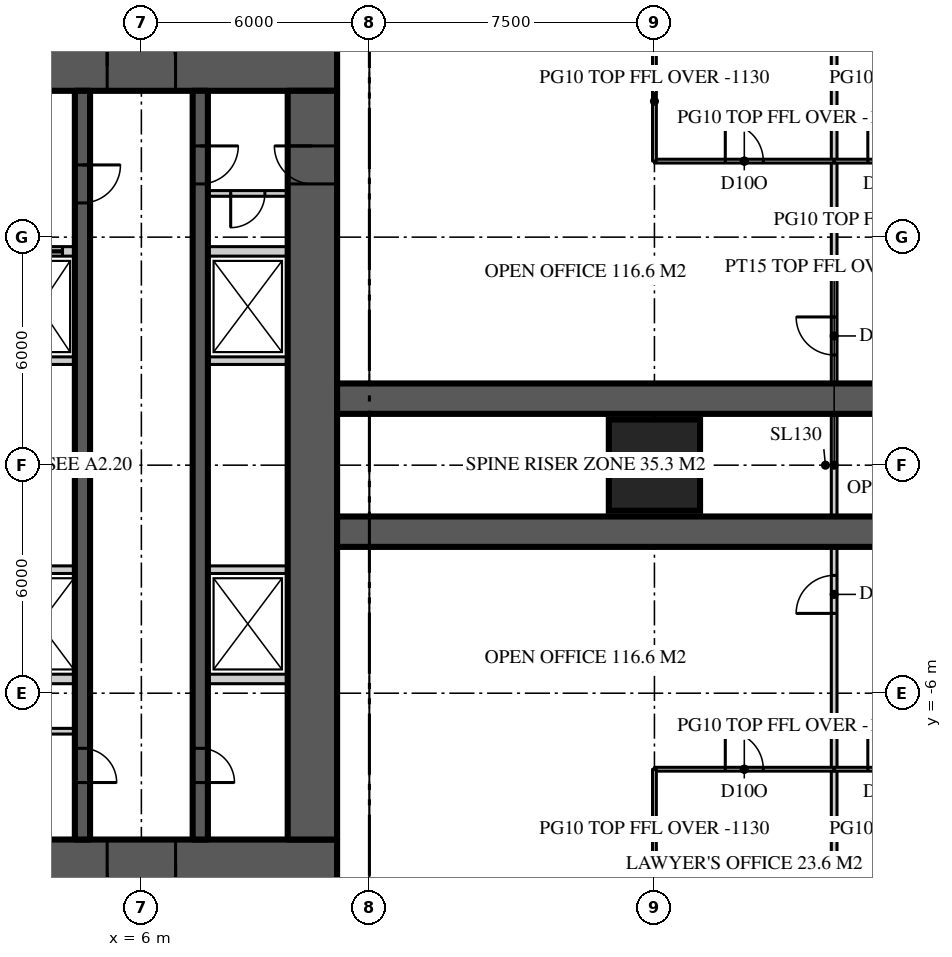
"""IFC4 building model, lengths in metres.
Left out: names, types, materials, properties, quantities, classifications, styles, units other than length and angle.
Written with IfcOpenShell. Run it as: python <this file> out.ifc"""

import sys

from ifc_helpers import new_model, si_unit, direction, frame, frame_2d, origin, origin_2d, place, context, subcontext, project, spatial, rectangle, extrude, element, fill, save


model = new_model("IFC4")
c1 = context("Model", 3, precision=1e-05, world=origin(), true_north=direction((0.0, 1.0)))
c2 = subcontext(c1, "Body", "Model", "MODEL_VIEW")
j1 = project(units=[si_unit("LENGTHUNIT", "METRE"), si_unit("PLANEANGLEUNIT", "RADIAN")], contexts=[c1])
p1 = place(None, origin())
s1 = spatial("IfcSite", under=j1, at=p1, CompositionType="ELEMENT")
p2 = place(p1, origin())
s2 = spatial("IfcBuilding", under=s1, at=p2, CompositionType="ELEMENT")
p3 = place(p2, frame((0.0, 0.0, 135.9)))
s3 = spatial("IfcBuildingStorey", under=s2, at=p3, CompositionType="ELEMENT", Elevation=135.9)
p4 = place(p3, frame((-11.15, 10.5, 0.0), z_axis=(0.0, 0.0, 1.0), x_axis=(1.0, 0.0, 0.0)))
e1 = element("IfcWall", 1, at=p4, inside=s3, PredefinedType="SHEAR", context=c2, shape_type="SweptSolid", body=[
    extrude(rectangle(XDim=22.3, YDim=1.3, at=frame_2d((11.15, 0.0))), origin(), (0.0, 0.0, 1.0), 3.9),
])
p5 = place(p4, frame((4.25, 0.0, 0.0)))
e2 = element("IfcOpeningElement", 2, at=p5, cuts=e1, PredefinedType="OPENING", context=c2, shape_type="SweptSolid", body=[
    extrude(rectangle(XDim=1.8, YDim=2.2, at=frame_2d((0.9, 1.1))), frame((0.0, 0.66, 0.0), z_axis=(0.0, -1.0, 0.0), x_axis=(1.0, 0.0, 0.0)), (0.0, 0.0, 1.0), 1.32),
])
p6 = place(p4, frame((16.25, 0.0, 0.0)))
e3 = element("IfcOpeningElement", 3, at=p6, cuts=e1, PredefinedType="OPENING", context=c2, shape_type="SweptSolid", body=[
    extrude(rectangle(XDim=1.8, YDim=2.2, at=frame_2d((0.9, 1.1))), frame((0.0, 0.66, 0.0), z_axis=(0.0, -1.0, 0.0), x_axis=(1.0, 0.0, 0.0)), (0.0, 0.0, 1.0), 1.32),
])
p7 = place(p3, frame((11.15, -10.5, 0.0), z_axis=(0.0, 0.0, 1.0), x_axis=(-1.0, 0.0, 0.0)))
e4 = element("IfcWall", 4, at=p7, inside=s3, PredefinedType="SHEAR", context=c2, shape_type="SweptSolid", body=[
    extrude(rectangle(XDim=22.3, YDim=1.3, at=frame_2d((11.15, 0.0))), origin(), (0.0, 0.0, 1.0), 3.9),
])
p8 = place(p7, frame((16.25, 0.0, 0.0)))
e5 = element("IfcOpeningElement", 5, at=p8, cuts=e4, PredefinedType="OPENING", context=c2, shape_type="SweptSolid", body=[
    extrude(rectangle(XDim=1.8, YDim=2.2, at=frame_2d((0.9, 1.1))), frame((0.0, 0.66, 0.0), z_axis=(0.0, -1.0, 0.0), x_axis=(1.0, 0.0, 0.0)), (0.0, 0.0, 1.0), 1.32),
])
p9 = place(p7, frame((4.25, 0.0, 0.0)))
e6 = element("IfcOpeningElement", 6, at=p9, cuts=e4, PredefinedType="OPENING", context=c2, shape_type="SweptSolid", body=[
    extrude(rectangle(XDim=1.8, YDim=2.2, at=frame_2d((0.9, 1.1))), frame((0.0, 0.66, 0.0), z_axis=(0.0, -1.0, 0.0), x_axis=(1.0, 0.0, 0.0)), (0.0, 0.0, 1.0), 1.32),
])
p10 = place(p3, frame((10.5, -9.85, 0.0), z_axis=(0.0, 0.0, 1.0), x_axis=(0.0, 1.0, 0.0)))
e7 = element("IfcWall", 7, at=p10, inside=s3, PredefinedType="SHEAR", context=c2, shape_type="SweptSolid", body=[
    extrude(rectangle(XDim=19.7, YDim=1.3, at=frame_2d((9.85, 0.0))), origin(), (0.0, 0.0, 1.0), 3.9),
])
p11 = place(p10, frame((17.25, 0.0, 0.0)))
e8 = element("IfcOpeningElement", 8, at=p11, cuts=e7, PredefinedType="OPENING", context=c2, shape_type="SweptSolid", body=[
    extrude(rectangle(XDim=1.0, YDim=2.2, at=frame_2d((0.5, 1.1))), frame((0.0, 0.66, 0.0), z_axis=(0.0, -1.0, 0.0), x_axis=(1.0, 0.0, 0.0)), (0.0, 0.0, 1.0), 1.32),
])
for number, where, z_axis, x_axis in (
    (9, (11.15, -1.75, 0.0), (0.0, 0.0, 1.0), (1.0, 0.0, 0.0)),
    (10, (11.15, 1.75, 0.0), (0.0, 0.0, 1.0), (1.0, 0.0, 0.0)),
):
    element("IfcWall", number, at=place(p3, frame(where, z_axis=z_axis, x_axis=x_axis)), inside=s3, PredefinedType="SHEAR", context=c2, shape_type="SweptSolid", body=[
        extrude(rectangle(XDim=15.25, YDim=0.8, at=frame_2d((7.625, 0.0))), origin(), (0.0, 0.0, 1.0), 3.9),
    ])
p12 = place(p3, frame((19.5, 0.0, 0.0), z_axis=(0.0, 0.0, 1.0), x_axis=(1.0, 0.0, 0.0)))
e11 = element("IfcColumn", 11, at=p12, inside=s3, PredefinedType="COLUMN", context=c2, shape_type="SweptSolid", body=[
    extrude(rectangle(XDim=2.4, YDim=2.4, at=origin_2d()), origin(), (0.0, 0.0, 1.0), 3.9),
])
p13 = place(p3, frame((7.55, 9.85, 0.0), z_axis=(0.0, 0.0, 1.0), x_axis=(0.0, -1.0, 0.0)))
e12 = element("IfcWall", 12, at=p13, inside=s3, PredefinedType="SHEAR", context=c2, shape_type="SweptSolid", body=[
    extrude(rectangle(XDim=19.7, YDim=0.4, at=frame_2d((9.85, 0.0))), origin(), (0.0, 0.0, 1.0), 3.9),
])
p14 = place(p13, frame((1.45, 0.0, 0.0)))
e13 = element("IfcOpeningElement", 13, at=p14, cuts=e12, PredefinedType="OPENING", context=c2, shape_type="SweptSolid", body=[
    extrude(rectangle(XDim=1.0, YDim=2.2, at=frame_2d((0.5, 1.1))), frame((0.0, 0.21, 0.0), z_axis=(0.0, -1.0, 0.0), x_axis=(1.0, 0.0, 0.0)), (0.0, 0.0, 1.0), 0.42),
])
p15 = place(p13, frame((17.3, 0.0, 0.0)))
e14 = element("IfcOpeningElement", 14, at=p15, cuts=e12, PredefinedType="OPENING", context=c2, shape_type="SweptSolid", body=[
    extrude(rectangle(XDim=0.9, YDim=2.1, at=frame_2d((0.45, 1.05))), frame((0.0, 0.21, 0.0), z_axis=(0.0, -1.0, 0.0), x_axis=(1.0, 0.0, 0.0)), (0.0, 0.0, 1.0), 0.42),
])
p16 = place(p3, frame((4.45, 9.85, 0.0), z_axis=(0.0, 0.0, 1.0), x_axis=(0.0, -1.0, 0.0)))
e15 = element("IfcWall", 15, at=p16, inside=s3, PredefinedType="SHEAR", context=c2, shape_type="SweptSolid", body=[
    extrude(rectangle(XDim=19.7, YDim=0.4, at=frame_2d((9.85, 0.0))), origin(), (0.0, 0.0, 1.0), 3.9),
])
p17 = place(p16, frame((1.95, 0.0, 0.0)))
e16 = element("IfcOpeningElement", 16, at=p17, cuts=e15, PredefinedType="OPENING", context=c2, shape_type="SweptSolid", body=[
    extrude(rectangle(XDim=1.0, YDim=2.2, at=frame_2d((0.5, 1.1))), frame((0.0, 0.21, 0.0), z_axis=(0.0, -1.0, 0.0), x_axis=(1.0, 0.0, 0.0)), (0.0, 0.0, 1.0), 0.42),
])
p18 = place(p16, frame((17.3, 0.0, 0.0)))
e17 = element("IfcOpeningElement", 17, at=p18, cuts=e15, PredefinedType="OPENING", context=c2, shape_type="SweptSolid", body=[
    extrude(rectangle(XDim=0.9, YDim=2.1, at=frame_2d((0.45, 1.05))), frame((0.0, 0.21, 0.0), z_axis=(0.0, -1.0, 0.0), x_axis=(1.0, 0.0, 0.0)), (0.0, 0.0, 1.0), 0.42),
])
p19 = place(p3, frame((2.4, 5.625, 0.0), z_axis=(0.0, 0.0, 1.0), x_axis=(1.0, 0.0, 0.0)))
e18 = element("IfcWall", 18, at=p19, inside=s3, PredefinedType="SOLIDWALL", context=c2, shape_type="SweptSolid", body=[
    extrude(rectangle(XDim=1.85, YDim=0.25, at=frame_2d((0.925, 0.0))), origin(), (0.0, 0.0, 1.0), 3.7),
])
p20 = place(p19, frame((0.325, 0.0, 0.0)))
e19 = element("IfcOpeningElement", 19, at=p20, cuts=e18, PredefinedType="OPENING", context=c2, shape_type="SweptSolid", body=[
    extrude(rectangle(XDim=1.2, YDim=2.2, at=frame_2d((0.6, 1.1))), frame((0.0, 0.135, 0.0), z_axis=(0.0, -1.0, 0.0), x_axis=(1.0, 0.0, 0.0)), (0.0, 0.0, 1.0), 0.27),
])
p21 = place(p3, frame((7.75, 5.625, 0.0), z_axis=(0.0, 0.0, 1.0), x_axis=(1.0, 0.0, 0.0)))
e20 = element("IfcWall", 20, at=p21, inside=s3, PredefinedType="SOLIDWALL", context=c2, shape_type="SweptSolid", body=[
    extrude(rectangle(XDim=2.1, YDim=0.25, at=frame_2d((1.05, 0.0))), origin(), (0.0, 0.0, 1.0), 3.7),
])
p22 = place(p3, frame((2.4, -5.625, 0.0), z_axis=(0.0, 0.0, 1.0), x_axis=(1.0, 0.0, 0.0)))
e21 = element("IfcWall", 21, at=p22, inside=s3, PredefinedType="SOLIDWALL", context=c2, shape_type="SweptSolid", body=[
    extrude(rectangle(XDim=1.85, YDim=0.25, at=frame_2d((0.925, 0.0))), origin(), (0.0, 0.0, 1.0), 3.7),
])
p23 = place(p3, frame((7.75, -5.625, 0.0), z_axis=(0.0, 0.0, 1.0), x_axis=(1.0, 0.0, 0.0)))
e22 = element("IfcWall", 22, at=p23, inside=s3, PredefinedType="SOLIDWALL", context=c2, shape_type="SweptSolid", body=[
    extrude(rectangle(XDim=2.1, YDim=0.25, at=frame_2d((1.05, 0.0))), origin(), (0.0, 0.0, 1.0), 3.7),
])
p24 = place(p3, frame((2.4, -2.75, 0.0), z_axis=(0.0, 0.0, 1.0), x_axis=(1.0, 0.0, 0.0)))
e23 = element("IfcWall", 23, at=p24, inside=s3, PredefinedType="SOLIDWALL", context=c2, shape_type="SweptSolid", body=[
    extrude(rectangle(XDim=1.85, YDim=0.2, at=frame_2d((0.925, 0.0))), origin(), (0.0, 0.0, 1.0), 3.7),
])
p25 = place(p3, frame((7.75, -2.75, 0.0), z_axis=(0.0, 0.0, 1.0), x_axis=(1.0, 0.0, 0.0)))
e24 = element("IfcWall", 24, at=p25, inside=s3, PredefinedType="SOLIDWALL", context=c2, shape_type="SweptSolid", body=[
    extrude(rectangle(XDim=2.1, YDim=0.2, at=frame_2d((1.05, 0.0))), origin(), (0.0, 0.0, 1.0), 3.7),
])
p26 = place(p3, frame((2.4, 2.75, 0.0), z_axis=(0.0, 0.0, 1.0), x_axis=(1.0, 0.0, 0.0)))
e25 = element("IfcWall", 25, at=p26, inside=s3, PredefinedType="SOLIDWALL", context=c2, shape_type="SweptSolid", body=[
    extrude(rectangle(XDim=1.85, YDim=0.2, at=frame_2d((0.925, 0.0))), origin(), (0.0, 0.0, 1.0), 3.7),
])
p27 = place(p3, frame((7.75, 2.75, 0.0), z_axis=(0.0, 0.0, 1.0), x_axis=(1.0, 0.0, 0.0)))
e26 = element("IfcWall", 26, at=p27, inside=s3, PredefinedType="SOLIDWALL", context=c2, shape_type="SweptSolid", body=[
    extrude(rectangle(XDim=2.1, YDim=0.2, at=frame_2d((1.05, 0.0))), origin(), (0.0, 0.0, 1.0), 3.7),
])
p28 = place(p3, frame((24.229, -12.82, 0.0), z_axis=(0.0, 0.0, 1.0), x_axis=(0.0, 1.0, 0.0)))
e27 = element("IfcWall", 27, at=p28, inside=s3, PredefinedType="PARTITIONING", context=c2, shape_type="SweptSolid", body=[
    extrude(rectangle(XDim=25.64, YDim=0.15, at=frame_2d((12.82, 0.0))), origin(), (0.0, 0.0, 1.0), 3.77),
])
p29 = place(p28, frame((15.72, 0.0, 0.0)))
e28 = element("IfcOpeningElement", 28, at=p29, cuts=e27, PredefinedType="OPENING", context=c2, shape_type="SweptSolid", body=[
    extrude(rectangle(XDim=1.0, YDim=2.2, at=frame_2d((0.5, 1.1))), frame((0.0, 0.085, 0.0), z_axis=(0.0, -1.0, 0.0), x_axis=(1.0, 0.0, 0.0)), (0.0, 0.0, 1.0), 0.17),
])
p30 = place(p28, frame((8.92, 0.0, 0.0)))
e29 = element("IfcOpeningElement", 29, at=p30, cuts=e27, PredefinedType="OPENING", context=c2, shape_type="SweptSolid", body=[
    extrude(rectangle(XDim=1.0, YDim=2.2, at=frame_2d((0.5, 1.1))), frame((0.0, 0.085, 0.0), z_axis=(0.0, -1.0, 0.0), x_axis=(1.0, 0.0, 0.0)), (0.0, 0.0, 1.0), 0.17),
])
p31 = place(p3, frame((19.5, 8.0, 0.0), z_axis=(0.0, 0.0, 1.0), x_axis=(1.0, 0.0, 0.0)))
e30 = element("IfcWall", 30, at=p31, inside=s3, PredefinedType="PARTITIONING", context=c2, shape_type="SweptSolid", body=[
    extrude(rectangle(XDim=4.729, YDim=0.1, at=frame_2d((2.365, 0.0))), origin(), (0.0, 0.0, 1.0), 3.77),
])
p32 = place(p31, frame((1.865, 0.0, 0.0)))
e31 = element("IfcOpeningElement", 31, at=p32, cuts=e30, PredefinedType="OPENING", context=c2, shape_type="SweptSolid", body=[
    extrude(rectangle(XDim=1.0, YDim=2.2, at=frame_2d((0.5, 1.1))), frame((0.0, 0.06, 0.0), z_axis=(0.0, -1.0, 0.0), x_axis=(1.0, 0.0, 0.0)), (0.0, 0.0, 1.0), 0.12),
])
p33 = place(p3, frame((24.229, 8.0, 0.0), z_axis=(0.0, 0.0, 1.0), x_axis=(1.0, 0.0, 0.0)))
e32 = element("IfcWall", 32, at=p33, inside=s3, PredefinedType="PARTITIONING", context=c2, shape_type="SweptSolid", body=[
    extrude(rectangle(XDim=5.73, YDim=0.1, at=frame_2d((2.865, 0.0))), origin(), (0.0, 0.0, 1.0), 3.77),
])
p34 = place(p33, frame((0.885, 0.0, 0.0)))
e33 = element("IfcOpeningElement", 33, at=p34, cuts=e32, PredefinedType="OPENING", context=c2, shape_type="SweptSolid", body=[
    extrude(rectangle(XDim=1.0, YDim=2.2, at=frame_2d((0.5, 1.1))), frame((0.0, 0.06, 0.0), z_axis=(0.0, -1.0, 0.0), x_axis=(1.0, 0.0, 0.0)), (0.0, 0.0, 1.0), 0.12),
])
p35 = place(p33, frame((3.75, 0.0, 0.0)))
e34 = element("IfcOpeningElement", 34, at=p35, cuts=e32, PredefinedType="OPENING", context=c2, shape_type="SweptSolid", body=[
    extrude(rectangle(XDim=1.0, YDim=2.2, at=frame_2d((0.5, 1.1))), frame((0.0, 0.06, 0.0), z_axis=(0.0, -1.0, 0.0), x_axis=(1.0, 0.0, 0.0)), (0.0, 0.0, 1.0), 0.12),
])
p36 = place(p3, frame((19.5, 8.0, 0.0), z_axis=(0.0, 0.0, 1.0), x_axis=(0.0, 1.0, 0.0)))
e35 = element("IfcWall", 35, at=p36, inside=s3, PredefinedType="PARTITIONING", context=c2, shape_type="SweptSolid", body=[
    extrude(rectangle(XDim=3.15, YDim=0.1, at=frame_2d((1.575, 0.0))), origin(), (0.0, 0.0, 1.0), 2.77),
])
p37 = place(p3, frame((19.5, -8.0, 0.0), z_axis=(0.0, 0.0, 1.0), x_axis=(1.0, 0.0, 0.0)))
e36 = element("IfcWall", 36, at=p37, inside=s3, PredefinedType="PARTITIONING", context=c2, shape_type="SweptSolid", body=[
    extrude(rectangle(XDim=4.729, YDim=0.1, at=frame_2d((2.365, 0.0))), origin(), (0.0, 0.0, 1.0), 3.77),
])
p38 = place(p37, frame((1.865, 0.0, 0.0)))
e37 = element("IfcOpeningElement", 37, at=p38, cuts=e36, PredefinedType="OPENING", context=c2, shape_type="SweptSolid", body=[
    extrude(rectangle(XDim=1.0, YDim=2.2, at=frame_2d((0.5, 1.1))), frame((0.0, 0.06, 0.0), z_axis=(0.0, -1.0, 0.0), x_axis=(1.0, 0.0, 0.0)), (0.0, 0.0, 1.0), 0.12),
])
p39 = place(p3, frame((24.229, -8.0, 0.0), z_axis=(0.0, 0.0, 1.0), x_axis=(1.0, 0.0, 0.0)))
e38 = element("IfcWall", 38, at=p39, inside=s3, PredefinedType="PARTITIONING", context=c2, shape_type="SweptSolid", body=[
    extrude(rectangle(XDim=5.73, YDim=0.1, at=frame_2d((2.865, 0.0))), origin(), (0.0, 0.0, 1.0), 3.77),
])
p40 = place(p39, frame((0.885, 0.0, 0.0)))
e39 = element("IfcOpeningElement", 39, at=p40, cuts=e38, PredefinedType="OPENING", context=c2, shape_type="SweptSolid", body=[
    extrude(rectangle(XDim=1.0, YDim=2.2, at=frame_2d((0.5, 1.1))), frame((0.0, 0.06, 0.0), z_axis=(0.0, -1.0, 0.0), x_axis=(1.0, 0.0, 0.0)), (0.0, 0.0, 1.0), 0.12),
])
p41 = place(p39, frame((3.75, 0.0, 0.0)))
e40 = element("IfcOpeningElement", 40, at=p41, cuts=e38, PredefinedType="OPENING", context=c2, shape_type="SweptSolid", body=[
    extrude(rectangle(XDim=1.0, YDim=2.2, at=frame_2d((0.5, 1.1))), frame((0.0, 0.06, 0.0), z_axis=(0.0, -1.0, 0.0), x_axis=(1.0, 0.0, 0.0)), (0.0, 0.0, 1.0), 0.12),
])
p42 = place(p3, frame((19.5, -8.0, 0.0), z_axis=(0.0, 0.0, 1.0), x_axis=(0.0, -1.0, 0.0)))
e41 = element("IfcWall", 41, at=p42, inside=s3, PredefinedType="PARTITIONING", context=c2, shape_type="SweptSolid", body=[
    extrude(rectangle(XDim=3.15, YDim=0.1, at=frame_2d((1.575, 0.0))), origin(), (0.0, 0.0, 1.0), 2.77),
])
p43 = place(p3, frame((2.4, -7.0, 0.0), z_axis=(0.0, 0.0, 1.0), x_axis=(1.0, 0.0, 0.0)))
e42 = element("IfcWall", 42, at=p43, inside=s3, PredefinedType="SOLIDWALL", context=c2, shape_type="SweptSolid", body=[
    extrude(rectangle(XDim=1.85, YDim=0.15, at=frame_2d((0.925, 0.0))), origin(), (0.0, 0.0, 1.0), 3.77),
])
p44 = place(p43, frame((0.1, 0.0, 0.0)))
e43 = element("IfcOpeningElement", 43, at=p44, cuts=e42, PredefinedType="OPENING", context=c2, shape_type="SweptSolid", body=[
    extrude(rectangle(XDim=0.9, YDim=2.1, at=frame_2d((0.45, 1.05))), frame((0.0, 0.085, 0.0), z_axis=(0.0, -1.0, 0.0), x_axis=(1.0, 0.0, 0.0)), (0.0, 0.0, 1.0), 0.17),
])
p45 = place(p3, frame((9.85, 7.15, 0.0), z_axis=(0.0, 0.0, 1.0), x_axis=(-1.0, 0.0, 0.0)))
e44 = element("IfcWall", 44, at=p45, inside=s3, PredefinedType="SOLIDWALL", context=c2, shape_type="SweptSolid", body=[
    extrude(rectangle(XDim=2.1, YDim=0.15, at=frame_2d((1.05, 0.0))), origin(), (0.0, 0.0, 1.0), 3.77),
])
p46 = place(p45, frame((0.6, 0.0, 0.0)))
e45 = element("IfcOpeningElement", 45, at=p46, cuts=e44, PredefinedType="OPENING", context=c2, shape_type="SweptSolid", body=[
    extrude(rectangle(XDim=0.9, YDim=2.1, at=frame_2d((0.45, 1.05))), frame((0.0, 0.085, 0.0), z_axis=(0.0, -1.0, 0.0), x_axis=(1.0, 0.0, 0.0)), (0.0, 0.0, 1.0), 0.17),
])
p47 = place(p6, origin())
e46 = element("IfcDoor", 46, at=p47, inside=s3, OperationType="DOUBLE_DOOR_DOUBLE_SWING", PredefinedType="DOOR", context=c2, shape_type="SweptSolid", body=[
    extrude(rectangle(XDim=1.8, YDim=2.2, at=frame_2d((0.9, 1.1))), frame((0.0, 0.025, 0.0), z_axis=(0.0, -1.0, 0.0), x_axis=(1.0, 0.0, 0.0)), (0.0, 0.0, 1.0), 0.05),
])
fill(e3, e46)
p48 = place(p9, origin())
e47 = element("IfcDoor", 47, at=p48, inside=s3, OperationType="DOUBLE_DOOR_DOUBLE_SWING", PredefinedType="DOOR", context=c2, shape_type="SweptSolid", body=[
    extrude(rectangle(XDim=1.8, YDim=2.2, at=frame_2d((0.9, 1.1))), frame((0.0, 0.025, 0.0), z_axis=(0.0, -1.0, 0.0), x_axis=(1.0, 0.0, 0.0)), (0.0, 0.0, 1.0), 0.05),
])
fill(e6, e47)
p49 = place(p14, origin())
e48 = element("IfcDoor", 48, at=p49, inside=s3, OperationType="SINGLE_SWING_LEFT", PredefinedType="DOOR", context=c2, shape_type="SweptSolid", body=[
    extrude(rectangle(XDim=1.0, YDim=2.2, at=frame_2d((0.5, 1.1))), frame((0.0, 0.025, 0.0), z_axis=(0.0, -1.0, 0.0), x_axis=(1.0, 0.0, 0.0)), (0.0, 0.0, 1.0), 0.05),
])
fill(e13, e48)
p50 = place(p11, origin())
e49 = element("IfcDoor", 49, at=p50, inside=s3, OperationType="SINGLE_SWING_RIGHT", PredefinedType="DOOR", context=c2, shape_type="SweptSolid", body=[
    extrude(rectangle(XDim=1.0, YDim=2.2, at=frame_2d((0.5, 1.1))), frame((0.0, 0.025, 0.0), z_axis=(0.0, -1.0, 0.0), x_axis=(1.0, 0.0, 0.0)), (0.0, 0.0, 1.0), 0.05),
])
fill(e8, e49)
p51 = place(p17, origin())
e50 = element("IfcDoor", 50, at=p51, inside=s3, OperationType="SINGLE_SWING_LEFT", PredefinedType="DOOR", context=c2, shape_type="SweptSolid", body=[
    extrude(rectangle(XDim=1.0, YDim=2.2, at=frame_2d((0.5, 1.1))), frame((0.0, 0.025, 0.0), z_axis=(0.0, -1.0, 0.0), x_axis=(1.0, 0.0, 0.0)), (0.0, 0.0, 1.0), 0.05),
])
fill(e16, e50)
p52 = place(p15, origin())
e51 = element("IfcDoor", 51, at=p52, inside=s3, OperationType="SINGLE_SWING_RIGHT", PredefinedType="DOOR", context=c2, shape_type="SweptSolid", body=[
    extrude(rectangle(XDim=0.9, YDim=2.1, at=frame_2d((0.45, 1.05))), frame((0.0, 0.025, 0.0), z_axis=(0.0, -1.0, 0.0), x_axis=(1.0, 0.0, 0.0)), (0.0, 0.0, 1.0), 0.05),
])
fill(e14, e51)
p53 = place(p18, origin())
e52 = element("IfcDoor", 52, at=p53, inside=s3, OperationType="SINGLE_SWING_RIGHT", PredefinedType="DOOR", context=c2, shape_type="SweptSolid", body=[
    extrude(rectangle(XDim=0.9, YDim=2.1, at=frame_2d((0.45, 1.05))), frame((0.0, 0.025, 0.0), z_axis=(0.0, -1.0, 0.0), x_axis=(1.0, 0.0, 0.0)), (0.0, 0.0, 1.0), 0.05),
])
fill(e17, e52)
p54 = place(p20, origin())
e53 = element("IfcDoor", 53, at=p54, inside=s3, OperationType="SLIDING_TO_LEFT", PredefinedType="DOOR", context=c2, shape_type="SweptSolid", body=[
    extrude(rectangle(XDim=1.2, YDim=2.2, at=frame_2d((0.6, 1.1))), frame((0.0, 0.025, 0.0), z_axis=(0.0, -1.0, 0.0), x_axis=(1.0, 0.0, 0.0)), (0.0, 0.0, 1.0), 0.05),
])
fill(e19, e53)
p55 = place(p29, origin())
e54 = element("IfcDoor", 54, at=p55, inside=s3, OperationType="SINGLE_SWING_RIGHT", PredefinedType="DOOR", context=c2, shape_type="SweptSolid", body=[
    extrude(rectangle(XDim=1.0, YDim=2.2, at=frame_2d((0.5, 1.1))), frame((0.0, 0.025, 0.0), z_axis=(0.0, -1.0, 0.0), x_axis=(1.0, 0.0, 0.0)), (0.0, 0.0, 1.0), 0.05),
])
fill(e28, e54)
p56 = place(p30, origin())
e55 = element("IfcDoor", 55, at=p56, inside=s3, OperationType="SINGLE_SWING_LEFT", PredefinedType="DOOR", context=c2, shape_type="SweptSolid", body=[
    extrude(rectangle(XDim=1.0, YDim=2.2, at=frame_2d((0.5, 1.1))), frame((0.0, 0.025, 0.0), z_axis=(0.0, -1.0, 0.0), x_axis=(1.0, 0.0, 0.0)), (0.0, 0.0, 1.0), 0.05),
])
fill(e29, e55)
p57 = place(p32, origin())
e56 = element("IfcDoor", 56, at=p57, inside=s3, OperationType="SINGLE_SWING_LEFT", PredefinedType="DOOR", context=c2, shape_type="SweptSolid", body=[
    extrude(rectangle(XDim=1.0, YDim=2.2, at=frame_2d((0.5, 1.1))), frame((0.0, 0.025, 0.0), z_axis=(0.0, -1.0, 0.0), x_axis=(1.0, 0.0, 0.0)), (0.0, 0.0, 1.0), 0.05),
])
fill(e31, e56)
p58 = place(p34, origin())
e57 = element("IfcDoor", 57, at=p58, inside=s3, OperationType="SINGLE_SWING_LEFT", PredefinedType="DOOR", context=c2, shape_type="SweptSolid", body=[
    extrude(rectangle(XDim=1.0, YDim=2.2, at=frame_2d((0.5, 1.1))), frame((0.0, 0.025, 0.0), z_axis=(0.0, -1.0, 0.0), x_axis=(1.0, 0.0, 0.0)), (0.0, 0.0, 1.0), 0.05),
])
fill(e33, e57)
p59 = place(p38, origin())
e58 = element("IfcDoor", 58, at=p59, inside=s3, OperationType="SINGLE_SWING_LEFT", PredefinedType="DOOR", context=c2, shape_type="SweptSolid", body=[
    extrude(rectangle(XDim=1.0, YDim=2.2, at=frame_2d((0.5, 1.1))), frame((0.0, 0.025, 0.0), z_axis=(0.0, -1.0, 0.0), x_axis=(1.0, 0.0, 0.0)), (0.0, 0.0, 1.0), 0.05),
])
fill(e37, e58)
p60 = place(p40, origin())
e59 = element("IfcDoor", 59, at=p60, inside=s3, OperationType="SINGLE_SWING_LEFT", PredefinedType="DOOR", context=c2, shape_type="SweptSolid", body=[
    extrude(rectangle(XDim=1.0, YDim=2.2, at=frame_2d((0.5, 1.1))), frame((0.0, 0.025, 0.0), z_axis=(0.0, -1.0, 0.0), x_axis=(1.0, 0.0, 0.0)), (0.0, 0.0, 1.0), 0.05),
])
fill(e39, e59)
p61 = place(p46, origin())
e60 = element("IfcDoor", 60, at=p61, inside=s3, OperationType="SINGLE_SWING_RIGHT", PredefinedType="DOOR", context=c2, shape_type="SweptSolid", body=[
    extrude(rectangle(XDim=0.9, YDim=2.1, at=frame_2d((0.45, 1.05))), frame((0.0, 0.025, 0.0), z_axis=(0.0, -1.0, 0.0), x_axis=(1.0, 0.0, 0.0)), (0.0, 0.0, 1.0), 0.05),
])
fill(e45, e60)
save(model, sys.argv[1])
